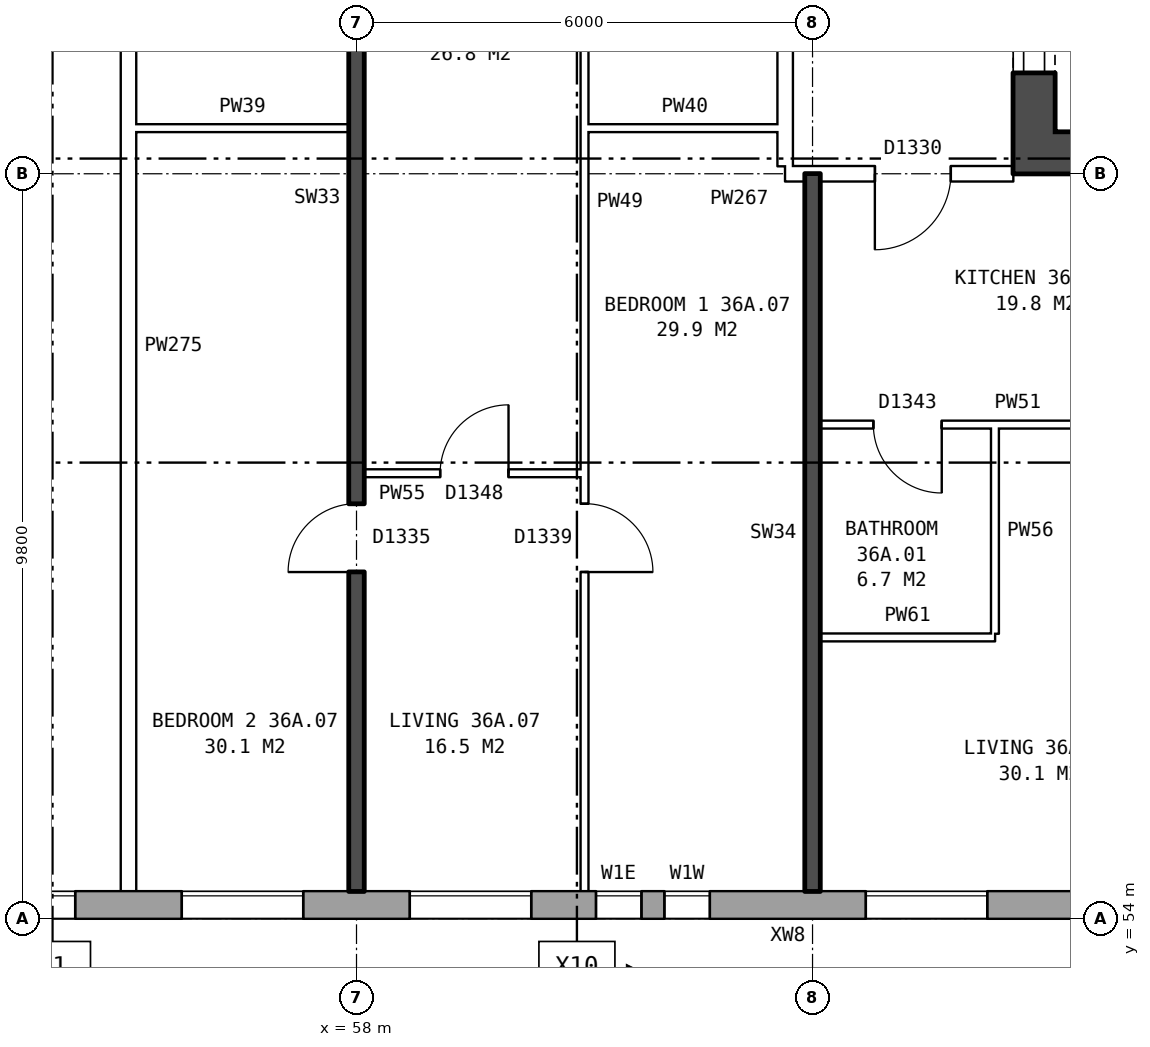
"""IFC4 building model, lengths in metres.
Left out: names, types, materials, properties, quantities, classifications, styles, units other than length and angle.
Written with IfcOpenShell. Run it as: python <this file> out.ifc"""

import sys

from ifc_helpers import new_model, si_unit, direction, frame, frame_2d, origin, place, context, subcontext, project, spatial, rectangle, extrude, element, fill, save


model = new_model("IFC4")
c1 = context("Model", 3, precision=1e-05, world=origin(), true_north=direction((0.0, 1.0)))
c2 = subcontext(c1, "Body", "Model", "MODEL_VIEW")
j1 = project(units=[si_unit("LENGTHUNIT", "METRE"), si_unit("PLANEANGLEUNIT", "RADIAN")], contexts=[c1])
p1 = place(None, origin())
s1 = spatial("IfcSite", under=j1, at=p1, CompositionType="ELEMENT")
p2 = place(p1, origin())
s2 = spatial("IfcBuilding", under=s1, at=p2, CompositionType="ELEMENT")
p3 = place(p2, frame((0.0, 0.0, 129.9)))
s3 = spatial("IfcBuildingStorey", under=s2, at=p3, CompositionType="ELEMENT", Elevation=129.9)
p4 = place(p3, frame((29.825, 54.18, 0.0), z_axis=(0.0, 0.0, 1.0), x_axis=(1.0, 0.0, 0.0)))
e1 = element("IfcWall", 1, at=p4, inside=s3, PredefinedType="STANDARD", context=c2, shape_type="SweptSolid", body=[
    extrude(rectangle(XDim=43.101, YDim=0.36, at=frame_2d((21.55, 0.0))), origin(), (0.0, 0.0, 1.0), 2.85),
])
p5 = place(p4, frame((1.875, 0.0, 0.8)))
e2 = element("IfcOpeningElement", 2, at=p5, cuts=e1, PredefinedType="OPENING", context=c2, shape_type="SweptSolid", body=[
    extrude(rectangle(XDim=1.6, YDim=1.8, at=frame_2d((0.8, 0.9))), frame((0.0, 0.19, 0.0), z_axis=(0.0, -1.0, 0.0), x_axis=(1.0, 0.0, 0.0)), (0.0, 0.0, 1.0), 0.38),
])
p6 = place(p4, frame((4.875, 0.0, 0.8)))
e3 = element("IfcOpeningElement", 3, at=p6, cuts=e1, PredefinedType="OPENING", context=c2, shape_type="SweptSolid", body=[
    extrude(rectangle(XDim=1.6, YDim=1.8, at=frame_2d((0.8, 0.9))), frame((0.0, 0.19, 0.0), z_axis=(0.0, -1.0, 0.0), x_axis=(1.0, 0.0, 0.0)), (0.0, 0.0, 1.0), 0.38),
])
p7 = place(p4, frame((6.775, 0.0, 0.8)))
e4 = element("IfcOpeningElement", 4, at=p7, cuts=e1, PredefinedType="OPENING", context=c2, shape_type="SweptSolid", body=[
    extrude(rectangle(XDim=1.6, YDim=1.8, at=frame_2d((0.8, 0.9))), frame((0.0, 0.19, 0.0), z_axis=(0.0, -1.0, 0.0), x_axis=(1.0, 0.0, 0.0)), (0.0, 0.0, 1.0), 0.38),
])
p8 = place(p4, frame((10.875, 0.0, 0.8)))
e5 = element("IfcOpeningElement", 5, at=p8, cuts=e1, PredefinedType="OPENING", context=c2, shape_type="SweptSolid", body=[
    extrude(rectangle(XDim=0.8, YDim=0.9, at=frame_2d((0.4, 0.45))), frame((0.0, 0.19, 0.0), z_axis=(0.0, -1.0, 0.0), x_axis=(1.0, 0.0, 0.0)), (0.0, 0.0, 1.0), 0.38),
])
p9 = place(p4, frame((13.875, 0.0, 0.8)))
e6 = element("IfcOpeningElement", 6, at=p9, cuts=e1, PredefinedType="OPENING", context=c2, shape_type="SweptSolid", body=[
    extrude(rectangle(XDim=1.6, YDim=1.8, at=frame_2d((0.8, 0.9))), frame((0.0, 0.19, 0.0), z_axis=(0.0, -1.0, 0.0), x_axis=(1.0, 0.0, 0.0)), (0.0, 0.0, 1.0), 0.38),
])
p10 = place(p4, frame((16.875, 0.0, 0.8)))
e7 = element("IfcOpeningElement", 7, at=p10, cuts=e1, PredefinedType="OPENING", context=c2, shape_type="SweptSolid", body=[
    extrude(rectangle(XDim=1.6, YDim=1.8, at=frame_2d((0.8, 0.9))), frame((0.0, 0.19, 0.0), z_axis=(0.0, -1.0, 0.0), x_axis=(1.0, 0.0, 0.0)), (0.0, 0.0, 1.0), 0.38),
])
p11 = place(p4, frame((19.875, 0.0, 0.8)))
e8 = element("IfcOpeningElement", 8, at=p11, cuts=e1, PredefinedType="OPENING", context=c2, shape_type="SweptSolid", body=[
    extrude(rectangle(XDim=1.6, YDim=1.8, at=frame_2d((0.8, 0.9))), frame((0.0, 0.19, 0.0), z_axis=(0.0, -1.0, 0.0), x_axis=(1.0, 0.0, 0.0)), (0.0, 0.0, 1.0), 0.38),
])
p12 = place(p4, frame((22.875, 0.0, 0.8)))
e9 = element("IfcOpeningElement", 9, at=p12, cuts=e1, PredefinedType="OPENING", context=c2, shape_type="SweptSolid", body=[
    extrude(rectangle(XDim=1.6, YDim=1.8, at=frame_2d((0.8, 0.9))), frame((0.0, 0.19, 0.0), z_axis=(0.0, -1.0, 0.0), x_axis=(1.0, 0.0, 0.0)), (0.0, 0.0, 1.0), 0.38),
])
p13 = place(p4, frame((25.875, 0.0, 0.8)))
e10 = element("IfcOpeningElement", 10, at=p13, cuts=e1, PredefinedType="OPENING", context=c2, shape_type="SweptSolid", body=[
    extrude(rectangle(XDim=1.6, YDim=1.8, at=frame_2d((0.8, 0.9))), frame((0.0, 0.19, 0.0), z_axis=(0.0, -1.0, 0.0), x_axis=(1.0, 0.0, 0.0)), (0.0, 0.0, 1.0), 0.38),
])
p14 = place(p4, frame((28.875, 0.0, 0.8)))
e11 = element("IfcOpeningElement", 11, at=p14, cuts=e1, PredefinedType="OPENING", context=c2, shape_type="SweptSolid", body=[
    extrude(rectangle(XDim=1.6, YDim=1.8, at=frame_2d((0.8, 0.9))), frame((0.0, 0.19, 0.0), z_axis=(0.0, -1.0, 0.0), x_axis=(1.0, 0.0, 0.0)), (0.0, 0.0, 1.0), 0.38),
])
p15 = place(p4, frame((31.325, 0.0, 0.15)))
e12 = element("IfcOpeningElement", 12, at=p15, cuts=e1, PredefinedType="OPENING", context=c2, shape_type="SweptSolid", body=[
    extrude(rectangle(XDim=0.6, YDim=1.8, at=frame_2d((0.3, 0.9))), frame((0.0, 0.19, 0.0), z_axis=(0.0, -1.0, 0.0), x_axis=(1.0, 0.0, 0.0)), (0.0, 0.0, 1.0), 0.38),
])
p16 = place(p4, frame((34.875, 0.0, 0.8)))
e13 = element("IfcOpeningElement", 13, at=p16, cuts=e1, PredefinedType="OPENING", context=c2, shape_type="SweptSolid", body=[
    extrude(rectangle(XDim=1.6, YDim=1.8, at=frame_2d((0.8, 0.9))), frame((0.0, 0.19, 0.0), z_axis=(0.0, -1.0, 0.0), x_axis=(1.0, 0.0, 0.0)), (0.0, 0.0, 1.0), 0.38),
])
p17 = place(p4, frame((37.875, 0.0, 0.8)))
e14 = element("IfcOpeningElement", 14, at=p17, cuts=e1, PredefinedType="OPENING", context=c2, shape_type="SweptSolid", body=[
    extrude(rectangle(XDim=1.6, YDim=1.8, at=frame_2d((0.8, 0.9))), frame((0.0, 0.19, 0.0), z_axis=(0.0, -1.0, 0.0), x_axis=(1.0, 0.0, 0.0)), (0.0, 0.0, 1.0), 0.38),
])
p18 = place(p4, frame((40.875, 0.0, 0.8)))
e15 = element("IfcOpeningElement", 15, at=p18, cuts=e1, PredefinedType="OPENING", context=c2, shape_type="SweptSolid", body=[
    extrude(rectangle(XDim=1.6, YDim=1.8, at=frame_2d((0.8, 0.9))), frame((0.0, 0.19, 0.0), z_axis=(0.0, -1.0, 0.0), x_axis=(1.0, 0.0, 0.0)), (0.0, 0.0, 1.0), 0.38),
])
p19 = place(p4, frame((8.675, 0.0, 1.3)))
e16 = element("IfcOpeningElement", 16, at=p19, cuts=e1, PredefinedType="OPENING", context=c2, shape_type="SweptSolid", body=[
    extrude(rectangle(XDim=0.6, YDim=1.2, at=frame_2d((0.3, 0.6))), frame((0.0, 0.19, 0.0), z_axis=(0.0, -1.0, 0.0), x_axis=(1.0, 0.0, 0.0)), (0.0, 0.0, 1.0), 0.38),
])
p20 = place(p4, frame((11.975, 0.0, 0.8)))
e17 = element("IfcOpeningElement", 17, at=p20, cuts=e1, PredefinedType="OPENING", context=c2, shape_type="SweptSolid", body=[
    extrude(rectangle(XDim=1.6, YDim=1.8, at=frame_2d((0.8, 0.9))), frame((0.0, 0.19, 0.0), z_axis=(0.0, -1.0, 0.0), x_axis=(1.0, 0.0, 0.0)), (0.0, 0.0, 1.0), 0.38),
])
p21 = place(p4, frame((32.225, 0.0, 0.25)))
e18 = element("IfcOpeningElement", 18, at=p21, cuts=e1, PredefinedType="OPENING", context=c2, shape_type="SweptSolid", body=[
    extrude(rectangle(XDim=0.6, YDim=0.9, at=frame_2d((0.3, 0.45))), frame((0.0, 0.19, 0.0), z_axis=(0.0, -1.0, 0.0), x_axis=(1.0, 0.0, 0.0)), (0.0, 0.0, 1.0), 0.38),
])
p22 = place(p3, frame((66.915, 63.8, 0.0), z_axis=(0.0, 0.0, 1.0), x_axis=(0.0, 1.0, 0.0)))
e19 = element("IfcWall", 19, at=p22, inside=s3, PredefinedType="SHEAR", context=c2, shape_type="SweptSolid", body=[
    extrude(rectangle(XDim=12.4, YDim=0.55, at=frame_2d((6.2, 0.0))), origin(), (0.0, 0.0, 1.0), 2.85),
])
p23 = place(p22, frame((1.325, 0.0, 0.0)))
e20 = element("IfcOpeningElement", 20, at=p23, cuts=e19, PredefinedType="OPENING", context=c2, shape_type="SweptSolid", body=[
    extrude(rectangle(XDim=1.1, YDim=2.1, at=frame_2d((0.55, 1.05))), frame((0.0, 0.285, 0.0), z_axis=(0.0, -1.0, 0.0), x_axis=(1.0, 0.0, 0.0)), (0.0, 0.0, 1.0), 0.57),
])
p24 = place(p22, frame((3.6, 0.0, 0.0)))
e21 = element("IfcOpeningElement", 21, at=p24, cuts=e19, PredefinedType="OPENING", context=c2, shape_type="SweptSolid", body=[
    extrude(rectangle(XDim=1.1, YDim=2.1, at=frame_2d((0.55, 1.05))), frame((0.0, 0.285, 0.0), z_axis=(0.0, -1.0, 0.0), x_axis=(1.0, 0.0, 0.0)), (0.0, 0.0, 1.0), 0.57),
])
p25 = place(p22, frame((5.8, 0.0, 0.0)))
e22 = element("IfcOpeningElement", 22, at=p25, cuts=e19, PredefinedType="OPENING", context=c2, shape_type="SweptSolid", body=[
    extrude(rectangle(XDim=1.1, YDim=2.1, at=frame_2d((0.55, 1.05))), frame((0.0, 0.285, 0.0), z_axis=(0.0, -1.0, 0.0), x_axis=(1.0, 0.0, 0.0)), (0.0, 0.0, 1.0), 0.57),
])
p26 = place(p22, frame((8.0, 0.0, 0.0)))
e23 = element("IfcOpeningElement", 23, at=p26, cuts=e19, PredefinedType="OPENING", context=c2, shape_type="SweptSolid", body=[
    extrude(rectangle(XDim=1.1, YDim=2.1, at=frame_2d((0.55, 1.05))), frame((0.0, 0.285, 0.0), z_axis=(0.0, -1.0, 0.0), x_axis=(1.0, 0.0, 0.0)), (0.0, 0.0, 1.0), 0.57),
])
p27 = place(p22, frame((9.9, 0.0, 0.0)))
e24 = element("IfcOpeningElement", 24, at=p27, cuts=e19, PredefinedType="OPENING", context=c2, shape_type="SweptSolid", body=[
    extrude(rectangle(XDim=1.1, YDim=2.1, at=frame_2d((0.55, 1.05))), frame((0.0, 0.285, 0.0), z_axis=(0.0, -1.0, 0.0), x_axis=(1.0, 0.0, 0.0)), (0.0, 0.0, 1.0), 0.57),
])
p28 = place(p3, frame((67.19, 64.075, 0.0), z_axis=(0.0, 0.0, 1.0), x_axis=(1.0, 0.0, 0.0)))
e25 = element("IfcWall", 25, at=p28, inside=s3, PredefinedType="SHEAR", context=c2, shape_type="SweptSolid", body=[
    extrude(rectangle(XDim=7.9, YDim=0.55, at=frame_2d((3.95, 0.0))), origin(), (0.0, 0.0, 1.0), 2.85),
])
p29 = place(p3, frame((63.64, 63.9, 0.0), z_axis=(0.0, 0.0, 1.0), x_axis=(0.0, 1.0, 0.0)))
e26 = element("IfcWall", 26, at=p29, inside=s3, PredefinedType="PARTITIONING", context=c2, shape_type="SweptSolid", body=[
    extrude(rectangle(XDim=12.2, YDim=0.2, at=frame_2d((6.1, 0.0))), origin(), (0.0, 0.0, 1.0), 2.85),
])
p30 = place(p29, frame((5.1, 0.0, 0.0)))
e27 = element("IfcOpeningElement", 27, at=p30, cuts=e26, PredefinedType="OPENING", context=c2, shape_type="SweptSolid", body=[
    extrude(rectangle(XDim=2.0, YDim=2.1, at=frame_2d((1.0, 1.05))), frame((0.0, 0.11, 0.0), z_axis=(0.0, -1.0, 0.0), x_axis=(1.0, 0.0, 0.0)), (0.0, 0.0, 1.0), 0.22),
])
p31 = place(p3, frame((64.1, 57.7, 0.0), z_axis=(0.0, 0.0, 1.0), x_axis=(1.0, 0.0, 0.0)))
e28 = element("IfcWall", 28, at=p31, inside=s3, PredefinedType="PARTITIONING", context=c2, shape_type="SweptSolid", body=[
    extrude(rectangle(XDim=2.3, YDim=0.1, at=frame_2d((1.15, 0.0))), origin(), (0.0, 0.0, 1.0), 2.85),
])
p32 = place(p3, frame((58.1, 59.86, 0.0), z_axis=(0.0, 0.0, 1.0), x_axis=(1.0, 0.0, 0.0)))
e29 = element("IfcWall", 29, at=p32, inside=s3, PredefinedType="PARTITIONING", context=c2, shape_type="SweptSolid", body=[
    extrude(rectangle(XDim=2.9, YDim=0.1, at=frame_2d((1.45, 0.0))), origin(), (0.0, 0.0, 1.0), 2.85),
])
p33 = place(p32, frame((1.0, 0.0, 0.0)))
e30 = element("IfcOpeningElement", 30, at=p33, cuts=e29, PredefinedType="OPENING", context=c2, shape_type="SweptSolid", body=[
    extrude(rectangle(XDim=0.9, YDim=2.1, at=frame_2d((0.45, 1.05))), frame((0.0, 0.06, 0.0), z_axis=(0.0, -1.0, 0.0), x_axis=(1.0, 0.0, 0.0)), (0.0, 0.0, 1.0), 0.12),
])
p34 = place(p3, frame((64.1, 60.5, 0.0), z_axis=(0.0, 0.0, 1.0), x_axis=(1.0, 0.0, 0.0)))
e31 = element("IfcWall", 31, at=p34, inside=s3, PredefinedType="PARTITIONING", context=c2, shape_type="SweptSolid", body=[
    extrude(rectangle(XDim=5.8, YDim=0.1, at=frame_2d((2.9, 0.0))), origin(), (0.0, 0.0, 1.0), 2.85),
])
p35 = place(p34, frame((3.6, 0.0, 0.0)))
e32 = element("IfcOpeningElement", 32, at=p35, cuts=e31, PredefinedType="OPENING", context=c2, shape_type="SweptSolid", body=[
    extrude(rectangle(XDim=0.9, YDim=2.1, at=frame_2d((0.45, 1.05))), frame((0.0, 0.06, 0.0), z_axis=(0.0, -1.0, 0.0), x_axis=(1.0, 0.0, 0.0)), (0.0, 0.0, 1.0), 0.12),
])
p36 = place(p34, frame((0.7, 0.0, 0.0)))
e33 = element("IfcOpeningElement", 33, at=p36, cuts=e31, PredefinedType="OPENING", context=c2, shape_type="SweptSolid", body=[
    extrude(rectangle(XDim=0.9, YDim=2.1, at=frame_2d((0.45, 1.05))), frame((0.0, 0.06, 0.0), z_axis=(0.0, -1.0, 0.0), x_axis=(1.0, 0.0, 0.0)), (0.0, 0.0, 1.0), 0.12),
])
p37 = place(p3, frame((63.64, 63.8, 0.0), z_axis=(0.0, 0.0, 1.0), x_axis=(1.0, 0.0, 0.0)))
e34 = element("IfcWall", 34, at=p37, inside=s3, PredefinedType="PARTITIONING", context=c2, shape_type="SweptSolid", body=[
    extrude(rectangle(XDim=3.0, YDim=0.2, at=frame_2d((1.5, 0.0))), origin(), (0.0, 0.0, 1.0), 2.85),
])
p38 = place(p37, frame((1.18, 0.0, 0.0)))
e35 = element("IfcOpeningElement", 35, at=p38, cuts=e34, PredefinedType="OPENING", context=c2, shape_type="SweptSolid", body=[
    extrude(rectangle(XDim=1.0, YDim=2.1, at=frame_2d((0.5, 1.05))), frame((0.0, 0.11, 0.0), z_axis=(0.0, -1.0, 0.0), x_axis=(1.0, 0.0, 0.0)), (0.0, 0.0, 1.0), 0.22),
])
p39 = place(p3, frame((55.1, 64.4, 0.0), z_axis=(0.0, 0.0, 1.0), x_axis=(1.0, 0.0, 0.0)))
e36 = element("IfcWall", 36, at=p39, inside=s3, PredefinedType="PARTITIONING", context=c2, shape_type="SweptSolid", body=[
    extrude(rectangle(XDim=2.8, YDim=0.1, at=frame_2d((1.4, 0.0))), origin(), (0.0, 0.0, 1.0), 2.85),
])
p40 = place(p3, frame((61.0, 64.4, 0.0), z_axis=(0.0, 0.0, 1.0), x_axis=(1.0, 0.0, 0.0)))
e37 = element("IfcWall", 37, at=p40, inside=s3, PredefinedType="PARTITIONING", context=c2, shape_type="SweptSolid", body=[
    extrude(rectangle(XDim=2.64, YDim=0.1, at=frame_2d((1.32, 0.0))), origin(), (0.0, 0.0, 1.0), 2.85),
])
p41 = place(p3, frame((55.0, 54.36, 0.0), z_axis=(0.0, 0.0, 1.0), x_axis=(0.0, 1.0, 0.0)))
e38 = element("IfcWall", 38, at=p41, inside=s3, PredefinedType="PARTITIONING", context=c2, shape_type="SweptSolid", body=[
    extrude(rectangle(XDim=14.34, YDim=0.2, at=frame_2d((7.17, 0.0))), origin(), (0.0, 0.0, 1.0), 2.85),
])
p42 = place(p3, frame((58.0, 54.36, 0.0), z_axis=(0.0, 0.0, 1.0), x_axis=(0.0, 1.0, 0.0)))
e39 = element("IfcWall", 39, at=p42, inside=s3, PredefinedType="SOLIDWALL", context=c2, shape_type="SweptSolid", body=[
    extrude(rectangle(XDim=14.44, YDim=0.2, at=frame_2d((7.22, 0.0))), origin(), (0.0, 0.0, 1.0), 2.85),
])
p43 = place(p42, frame((4.2, 0.0, 0.0)))
e40 = element("IfcOpeningElement", 40, at=p43, cuts=e39, PredefinedType="OPENING", context=c2, shape_type="SweptSolid", body=[
    extrude(rectangle(XDim=0.9, YDim=2.1, at=frame_2d((0.45, 1.05))), frame((0.0, 0.11, 0.0), z_axis=(0.0, -1.0, 0.0), x_axis=(1.0, 0.0, 0.0)), (0.0, 0.0, 1.0), 0.22),
])
p44 = place(p42, frame((13.14, 0.0, 0.0)))
e41 = element("IfcOpeningElement", 41, at=p44, cuts=e39, PredefinedType="OPENING", context=c2, shape_type="SweptSolid", body=[
    extrude(rectangle(XDim=0.9, YDim=2.1, at=frame_2d((0.45, 1.05))), frame((0.0, 0.11, 0.0), z_axis=(0.0, -1.0, 0.0), x_axis=(1.0, 0.0, 0.0)), (0.0, 0.0, 1.0), 0.22),
])
p45 = place(p3, frame((61.0, 54.36, 0.0), z_axis=(0.0, 0.0, 1.0), x_axis=(0.0, 1.0, 0.0)))
e42 = element("IfcWall", 42, at=p45, inside=s3, PredefinedType="PARTITIONING", context=c2, shape_type="SweptSolid", body=[
    extrude(rectangle(XDim=14.34, YDim=0.1, at=frame_2d((7.17, 0.0))), origin(), (0.0, 0.0, 1.0), 2.85),
])
p46 = place(p45, frame((4.2, 0.0, 0.0)))
e43 = element("IfcOpeningElement", 43, at=p46, cuts=e42, PredefinedType="OPENING", context=c2, shape_type="SweptSolid", body=[
    extrude(rectangle(XDim=0.9, YDim=2.1, at=frame_2d((0.45, 1.05))), frame((0.0, 0.06, 0.0), z_axis=(0.0, -1.0, 0.0), x_axis=(1.0, 0.0, 0.0)), (0.0, 0.0, 1.0), 0.12),
])
p47 = place(p45, frame((13.04, 0.0, 0.0)))
e44 = element("IfcOpeningElement", 44, at=p47, cuts=e42, PredefinedType="OPENING", context=c2, shape_type="SweptSolid", body=[
    extrude(rectangle(XDim=0.9, YDim=2.1, at=frame_2d((0.45, 1.05))), frame((0.0, 0.06, 0.0), z_axis=(0.0, -1.0, 0.0), x_axis=(1.0, 0.0, 0.0)), (0.0, 0.0, 1.0), 0.12),
])
p48 = place(p3, frame((64.0, 54.36, 0.0), z_axis=(0.0, 0.0, 1.0), x_axis=(0.0, 1.0, 0.0)))
e45 = element("IfcWall", 45, at=p48, inside=s3, PredefinedType="SOLIDWALL", context=c2, shape_type="SweptSolid", body=[
    extrude(rectangle(XDim=9.44, YDim=0.2, at=frame_2d((4.72, 0.0))), origin(), (0.0, 0.0, 1.0), 2.85),
])
p49 = place(p3, frame((66.4, 57.75, 0.0), z_axis=(0.0, 0.0, 1.0), x_axis=(0.0, 1.0, 0.0)))
e46 = element("IfcWall", 46, at=p49, inside=s3, PredefinedType="PARTITIONING", context=c2, shape_type="SweptSolid", body=[
    extrude(rectangle(XDim=2.7, YDim=0.1, at=frame_2d((1.35, 0.0))), origin(), (0.0, 0.0, 1.0), 2.85),
])
p50 = place(p12, origin())
e47 = element("IfcWindow", 47, at=p50, inside=s3, PartitioningType="SINGLE_PANEL", PredefinedType="WINDOW", context=c2, shape_type="SweptSolid", body=[
    extrude(rectangle(XDim=1.6, YDim=1.8, at=frame_2d((0.8, 0.9))), frame((0.0, 0.15, 0.0), z_axis=(0.0, -1.0, 0.0), x_axis=(1.0, 0.0, 0.0)), (0.0, 0.0, 1.0), 0.06),
])
fill(e9, e47)
p51 = place(p13, origin())
e48 = element("IfcWindow", 48, at=p51, inside=s3, PartitioningType="SINGLE_PANEL", PredefinedType="WINDOW", context=c2, shape_type="SweptSolid", body=[
    extrude(rectangle(XDim=1.6, YDim=1.8, at=frame_2d((0.8, 0.9))), frame((0.0, 0.15, 0.0), z_axis=(0.0, -1.0, 0.0), x_axis=(1.0, 0.0, 0.0)), (0.0, 0.0, 1.0), 0.06),
])
fill(e10, e48)
p52 = place(p14, origin())
e49 = element("IfcWindow", 49, at=p52, inside=s3, PartitioningType="SINGLE_PANEL", PredefinedType="WINDOW", context=c2, shape_type="SweptSolid", body=[
    extrude(rectangle(XDim=1.6, YDim=1.8, at=frame_2d((0.8, 0.9))), frame((0.0, 0.15, 0.0), z_axis=(0.0, -1.0, 0.0), x_axis=(1.0, 0.0, 0.0)), (0.0, 0.0, 1.0), 0.06),
])
fill(e11, e49)
p53 = place(p15, origin())
e50 = element("IfcWindow", 50, at=p53, inside=s3, PartitioningType="SINGLE_PANEL", PredefinedType="WINDOW", context=c2, shape_type="SweptSolid", body=[
    extrude(rectangle(XDim=0.6, YDim=1.8, at=frame_2d((0.3, 0.9))), frame((0.0, 0.15, 0.0), z_axis=(0.0, -1.0, 0.0), x_axis=(1.0, 0.0, 0.0)), (0.0, 0.0, 1.0), 0.06),
])
fill(e12, e50)
p54 = place(p16, origin())
e51 = element("IfcWindow", 51, at=p54, inside=s3, PartitioningType="SINGLE_PANEL", PredefinedType="WINDOW", context=c2, shape_type="SweptSolid", body=[
    extrude(rectangle(XDim=1.6, YDim=1.8, at=frame_2d((0.8, 0.9))), frame((0.0, 0.15, 0.0), z_axis=(0.0, -1.0, 0.0), x_axis=(1.0, 0.0, 0.0)), (0.0, 0.0, 1.0), 0.06),
])
fill(e13, e51)
p55 = place(p23, origin())
e52 = element("IfcDoor", 52, at=p55, inside=s3, OperationType="DOUBLE_DOOR_SLIDING", PredefinedType="DOOR", context=c2, shape_type="SweptSolid", body=[
    extrude(rectangle(XDim=1.1, YDim=2.1, at=frame_2d((0.55, 1.05))), frame((0.0, -0.21, 0.0), z_axis=(0.0, -1.0, 0.0), x_axis=(1.0, 0.0, 0.0)), (0.0, 0.0, 1.0), 0.05),
])
fill(e20, e52)
p56 = place(p38, frame((1.0, 0.0, 0.0), z_axis=(0.0, 0.0, 1.0), x_axis=(-1.0, 0.0, 0.0)))
e53 = element("IfcDoor", 53, at=p56, inside=s3, OperationType="SINGLE_SWING_RIGHT", PredefinedType="DOOR", context=c2, shape_type="SweptSolid", body=[
    extrude(rectangle(XDim=1.0, YDim=2.1, at=frame_2d((0.5, 1.05))), frame((0.0, 0.025, 0.0), z_axis=(0.0, -1.0, 0.0), x_axis=(1.0, 0.0, 0.0)), (0.0, 0.0, 1.0), 0.05),
])
fill(e35, e53)
p57 = place(p36, frame((0.9, 0.0, 0.0), z_axis=(0.0, 0.0, 1.0), x_axis=(-1.0, 0.0, 0.0)))
e54 = element("IfcDoor", 54, at=p57, inside=s3, OperationType="SINGLE_SWING_LEFT", PredefinedType="DOOR", context=c2, shape_type="SweptSolid", body=[
    extrude(rectangle(XDim=0.9, YDim=2.1, at=frame_2d((0.45, 1.05))), frame((0.0, 0.025, 0.0), z_axis=(0.0, -1.0, 0.0), x_axis=(1.0, 0.0, 0.0)), (0.0, 0.0, 1.0), 0.05),
])
fill(e33, e54)
p58 = place(p46, frame((0.9, 0.0, 0.0), z_axis=(0.0, 0.0, 1.0), x_axis=(-1.0, 0.0, 0.0)))
e55 = element("IfcDoor", 55, at=p58, inside=s3, OperationType="SINGLE_SWING_RIGHT", PredefinedType="DOOR", context=c2, shape_type="SweptSolid", body=[
    extrude(rectangle(XDim=0.9, YDim=2.1, at=frame_2d((0.45, 1.05))), frame((0.0, 0.025, 0.0), z_axis=(0.0, -1.0, 0.0), x_axis=(1.0, 0.0, 0.0)), (0.0, 0.0, 1.0), 0.05),
])
fill(e43, e55)
p59 = place(p43, origin())
e56 = element("IfcDoor", 56, at=p59, inside=s3, OperationType="SINGLE_SWING_LEFT", PredefinedType="DOOR", context=c2, shape_type="SweptSolid", body=[
    extrude(rectangle(XDim=0.9, YDim=2.1, at=frame_2d((0.45, 1.05))), frame((0.0, 0.025, 0.0), z_axis=(0.0, -1.0, 0.0), x_axis=(1.0, 0.0, 0.0)), (0.0, 0.0, 1.0), 0.05),
])
fill(e40, e56)
p60 = place(p33, origin())
e57 = element("IfcDoor", 57, at=p60, inside=s3, OperationType="SINGLE_SWING_RIGHT", PredefinedType="DOOR", context=c2, shape_type="SweptSolid", body=[
    extrude(rectangle(XDim=0.9, YDim=2.1, at=frame_2d((0.45, 1.05))), frame((0.0, 0.025, 0.0), z_axis=(0.0, -1.0, 0.0), x_axis=(1.0, 0.0, 0.0)), (0.0, 0.0, 1.0), 0.05),
])
fill(e30, e57)
p61 = place(p21, origin())
e58 = element("IfcWindow", 58, at=p61, inside=s3, PartitioningType="SINGLE_PANEL", PredefinedType="WINDOW", context=c2, shape_type="SweptSolid", body=[
    extrude(rectangle(XDim=0.6, YDim=0.9, at=frame_2d((0.3, 0.45))), frame((0.0, 0.15, 0.0), z_axis=(0.0, -1.0, 0.0), x_axis=(1.0, 0.0, 0.0)), (0.0, 0.0, 1.0), 0.06),
])
fill(e18, e58)
save(model, sys.argv[1])
